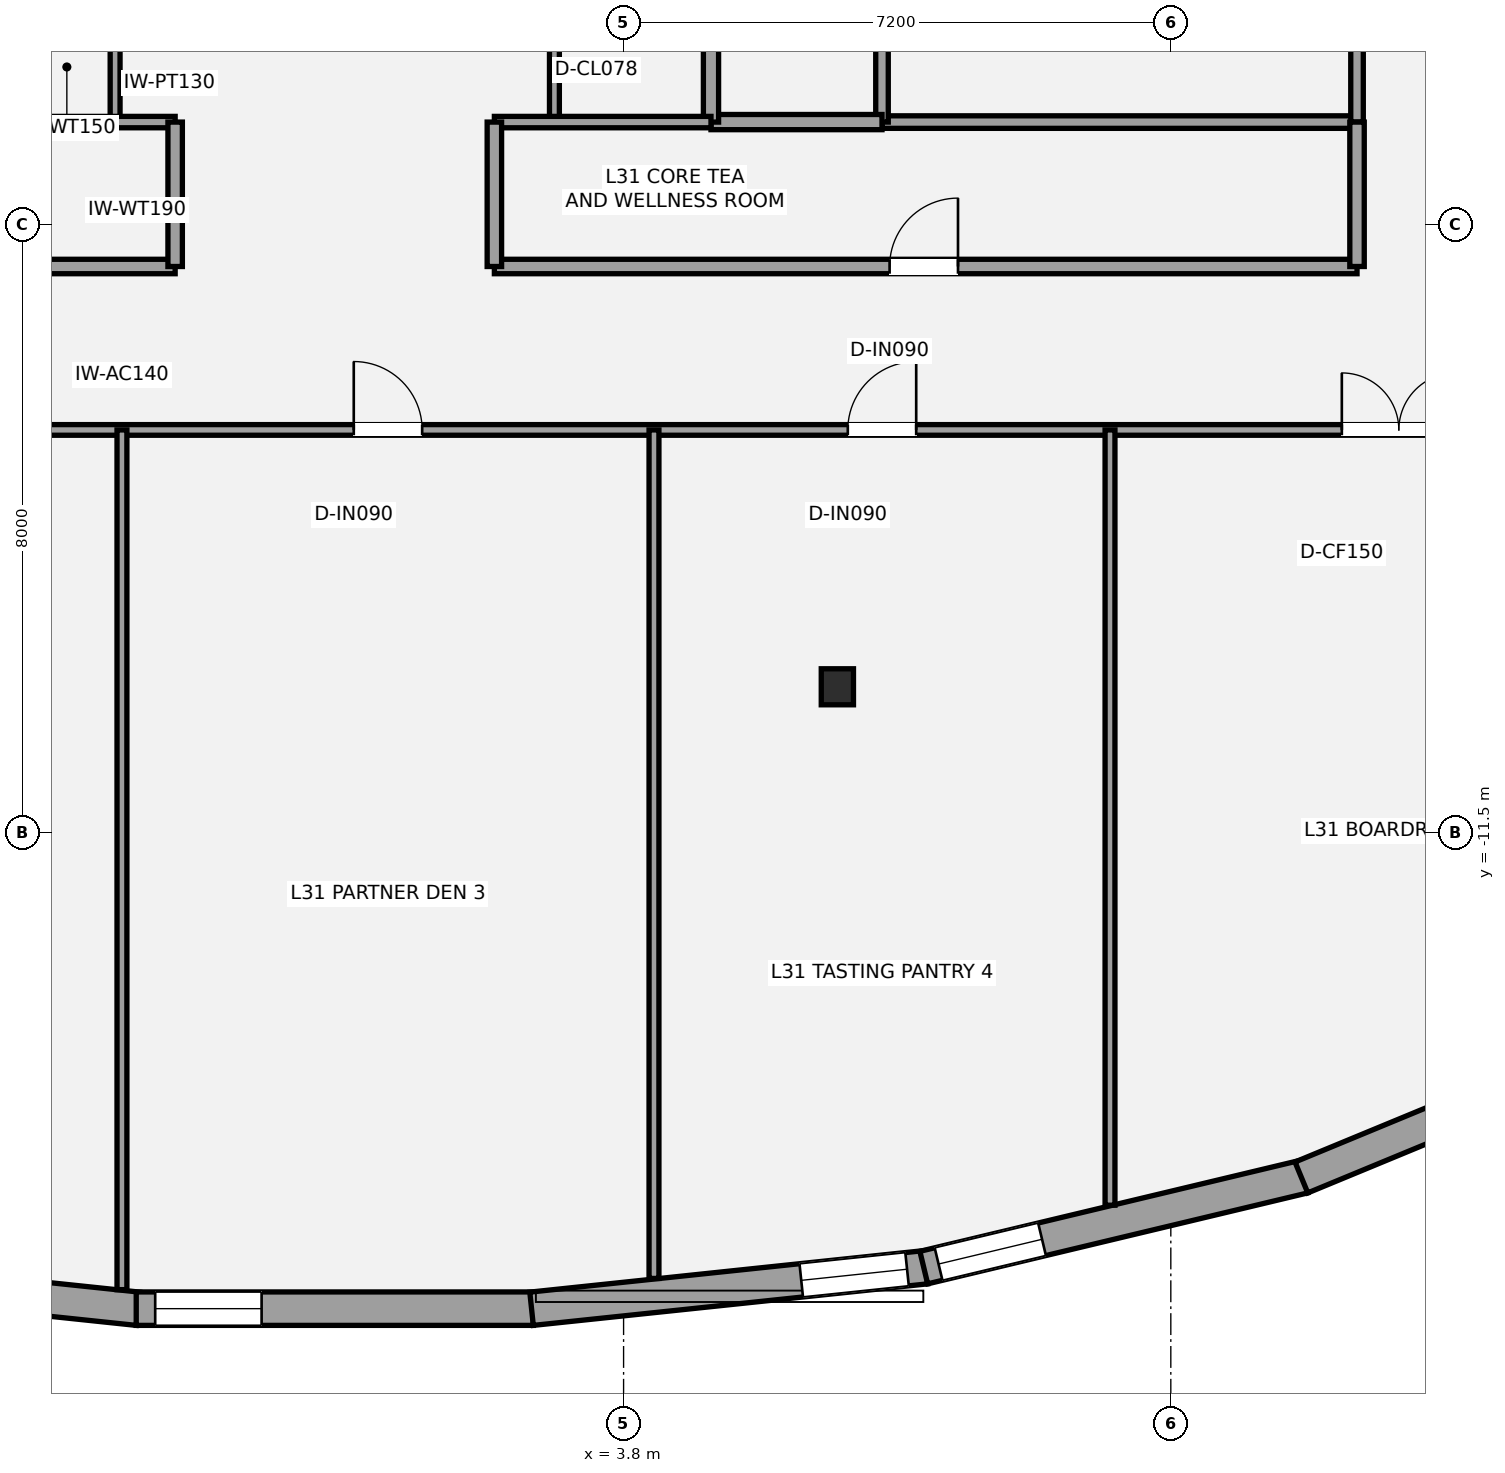
"""IFC4 building model, lengths in metres.
Left out: names, types, materials, properties, quantities, classifications, styles, units other than length and angle.
Written with IfcOpenShell. Run it as: python <this file> out.ifc"""

import sys

from ifc_helpers import new_model, si_unit, direction, frame, frame_2d, origin, origin_2d, place, context, subcontext, project, spatial, rectangle, i_section, extrude, element, fill, save


model = new_model("IFC4")
c1 = context("Model", 3, precision=1e-05, world=origin(), true_north=direction((0.0, 1.0)))
c2 = subcontext(c1, "Body", "Model", "MODEL_VIEW")
j1 = project(units=[si_unit("LENGTHUNIT", "METRE"), si_unit("PLANEANGLEUNIT", "RADIAN")], contexts=[c1])
p1 = place(None, origin())
s1 = spatial("IfcSite", under=j1, at=p1, CompositionType="ELEMENT")
p2 = place(p1, origin())
s2 = spatial("IfcBuilding", under=s1, at=p2, CompositionType="ELEMENT")
p3 = place(p2, frame((0.0, 0.0, 117.6)))
s3 = spatial("IfcBuildingStorey", under=s2, at=p3, CompositionType="ELEMENT", Elevation=117.6)
p4 = place(p3, frame((6.613, -9.579, 0.0), z_axis=(0.0, 0.0, 1.0), x_axis=(1.0, 0.0, 0.0)))
e1 = element("IfcColumn", 1, at=p4, inside=s3, PredefinedType="COLUMN", context=c2, shape_type="SweptSolid", body=[
    extrude(i_section(OverallWidth=0.424, OverallDepth=0.474, WebThickness=0.048, FlangeThickness=0.077, at=origin_2d()), origin(), (0.0, 0.0, 1.0), 3.5),
])
p5 = place(p3, frame((-2.589, -17.762, 0.0), z_axis=(0.0, 0.0, 1.0), x_axis=(-0.994501349718, 0.104723757619, 0.0)))
e2 = element("IfcWall", 2, at=p5, inside=s3, PredefinedType="STANDARD", context=c2, shape_type="SweptSolid", body=[
    extrude(rectangle(XDim=5.218, YDim=0.44, at=frame_2d((2.609, 0.0))), origin(), (0.0, 0.0, 1.0), 2.528),
])
p6 = place(p5, frame((3.568, 0.0, 0.85)))
e3 = element("IfcOpeningElement", 3, at=p6, cuts=e2, PredefinedType="OPENING", context=c2, shape_type="SweptSolid", body=[
    extrude(rectangle(XDim=1.4, YDim=1.55, at=frame_2d((0.7, 0.775))), frame((0.0, 0.23, 0.0), z_axis=(0.0, -1.0, 0.0), x_axis=(1.0, 0.0, 0.0)), (0.0, 0.0, 1.0), 0.46),
])
p7 = place(p3, frame((2.612, -17.761, 0.0), z_axis=(0.0, 0.0, 1.0), x_axis=(-1.0, 0.0, 0.0)))
e4 = element("IfcWall", 4, at=p7, inside=s3, PredefinedType="STANDARD", context=c2, shape_type="SweptSolid", body=[
    extrude(rectangle(XDim=5.225, YDim=0.44, at=frame_2d((2.612, 0.0))), origin(), (0.0, 0.0, 1.0), 2.528),
])
p8 = place(p7, frame((3.575, 0.0, 0.58)))
e5 = element("IfcOpeningElement", 5, at=p8, cuts=e4, PredefinedType="OPENING", context=c2, shape_type="SweptSolid", body=[
    extrude(rectangle(XDim=1.4, YDim=1.55, at=frame_2d((0.7, 0.775))), frame((0.0, 0.23, 0.0), z_axis=(0.0, -1.0, 0.0), x_axis=(1.0, 0.0, 0.0)), (0.0, 0.0, 1.0), 0.46),
])
p9 = place(p3, frame((7.778, -17.216, 0.0), z_axis=(0.0, 0.0, 1.0), x_axis=(-0.994501349718, -0.104723757619, 0.0)))
e6 = element("IfcWall", 6, at=p9, inside=s3, PredefinedType="STANDARD", context=c2, shape_type="SweptSolid", body=[
    extrude(rectangle(XDim=5.218, YDim=0.44, at=frame_2d((2.609, 0.0))), origin(), (0.0, 0.0, 1.0), 2.528),
])
p10 = place(p9, frame((0.25, 0.0, 0.58)))
e7 = element("IfcOpeningElement", 7, at=p10, cuts=e6, PredefinedType="OPENING", context=c2, shape_type="SweptSolid", body=[
    extrude(rectangle(XDim=1.4, YDim=1.55, at=frame_2d((0.7, 0.775))), frame((0.0, 0.23, 0.0), z_axis=(0.0, -1.0, 0.0), x_axis=(1.0, 0.0, 0.0)), (0.0, 0.0, 1.0), 0.46),
])
p11 = place(p3, frame((12.751, -16.024, 0.0), z_axis=(0.0, 0.0, 1.0), x_axis=(-0.972539655933, -0.232737228734, 0.0)))
e8 = element("IfcWall", 8, at=p11, inside=s3, PredefinedType="STANDARD", context=c2, shape_type="SweptSolid", body=[
    extrude(rectangle(XDim=5.142, YDim=0.44, at=frame_2d((2.571, 0.0))), origin(), (0.0, 0.0, 1.0), 2.528),
])
p12 = place(p11, frame((3.542, 0.0, 0.45)))
e9 = element("IfcOpeningElement", 9, at=p12, cuts=e8, PredefinedType="OPENING", context=c2, shape_type="SweptSolid", body=[
    extrude(rectangle(XDim=1.4, YDim=1.55, at=frame_2d((0.7, 0.775))), frame((0.0, 0.23, 0.0), z_axis=(0.0, -1.0, 0.0), x_axis=(1.0, 0.0, 0.0)), (0.0, 0.0, 1.0), 0.46),
])
p13 = place(p3, frame((17.286, -14.146, 0.0), z_axis=(0.0, 0.0, 1.0), x_axis=(-0.924140141084, -0.382053660678, 0.0)))
e10 = element("IfcWall", 10, at=p13, inside=s3, PredefinedType="STANDARD", context=c2, shape_type="SweptSolid", body=[
    extrude(rectangle(XDim=4.943, YDim=0.44, at=frame_2d((2.471, 0.0))), origin(), (0.0, 0.0, 1.0), 2.528),
])
p14 = place(p13, frame((0.2, 0.0, 0.45)))
e11 = element("IfcOpeningElement", 11, at=p14, cuts=e10, PredefinedType="OPENING", context=c2, shape_type="SweptSolid", body=[
    extrude(rectangle(XDim=1.4, YDim=1.55, at=frame_2d((0.7, 0.775))), frame((0.0, 0.23, 0.0), z_axis=(0.0, -1.0, 0.0), x_axis=(1.0, 0.0, 0.0)), (0.0, 0.0, 1.0), 0.46),
])
p15 = place(p3, frame((7.2, -2.15, 0.0), z_axis=(0.0, 0.0, 1.0), x_axis=(1.0, 0.0, 0.0)))
e12 = element("IfcWall", 12, at=p15, inside=s3, PredefinedType="PARTITIONING", context=c2, shape_type="SweptSolid", body=[
    extrude(rectangle(XDim=6.25, YDim=0.165, at=frame_2d((3.125, 0.0))), origin(), (0.0, 0.0, 1.0), 3.31),
])
p16 = place(p3, frame((7.2, -2.15, 0.0), z_axis=(0.0, 0.0, 1.0), x_axis=(0.0, 1.0, 0.0)))
e13 = element("IfcWall", 13, at=p16, inside=s3, PredefinedType="PARTITIONING", context=c2, shape_type="SweptSolid", body=[
    extrude(rectangle(XDim=3.3, YDim=0.165, at=frame_2d((1.65, 0.0))), origin(), (0.0, 0.0, 1.0), 2.763),
])
p17 = place(p3, frame((13.45, -2.15, 0.0), z_axis=(0.0, 0.0, 1.0), x_axis=(0.0, 1.0, 0.0)))
e14 = element("IfcWall", 14, at=p17, inside=s3, PredefinedType="PARTITIONING", context=c2, shape_type="SweptSolid", body=[
    extrude(rectangle(XDim=3.3, YDim=0.165, at=frame_2d((1.65, 0.0))), origin(), (0.0, 0.0, 1.0), 2.763),
])
p18 = place(p17, frame((1.15, 0.0, 0.0)))
e15 = element("IfcOpeningElement", 15, at=p18, cuts=e14, PredefinedType="OPENING", context=c2, shape_type="SweptSolid", body=[
    extrude(rectangle(XDim=1.05, YDim=2.15, at=frame_2d((0.525, 1.075))), frame((0.0, 0.093, 0.0), z_axis=(0.0, -1.0, 0.0), x_axis=(1.0, 0.0, 0.0)), (0.0, 0.0, 1.0), 0.185),
])
p19 = place(p3, frame((4.95, -2.15, 0.0), z_axis=(0.0, 0.0, 1.0), x_axis=(1.0, 0.0, 0.0)))
e16 = element("IfcWall", 16, at=p19, inside=s3, PredefinedType="SOLIDWALL", context=c2, shape_type="SweptSolid", body=[
    extrude(rectangle(XDim=2.25, YDim=0.2, at=frame_2d((1.125, 0.0))), origin(), (0.0, 0.0, 1.0), 3.31),
])
p20 = place(p3, frame((4.95, -2.15, 0.0), z_axis=(0.0, 0.0, 1.0), x_axis=(0.0, 1.0, 0.0)))
e17 = element("IfcWall", 17, at=p20, inside=s3, PredefinedType="SOLIDWALL", context=c2, shape_type="SweptSolid", body=[
    extrude(rectangle(XDim=3.3, YDim=0.2, at=frame_2d((1.65, 0.0))), origin(), (0.0, 0.0, 1.0), 2.763),
])
p21 = place(p20, frame((0.95, 0.0, 0.0)))
e18 = element("IfcOpeningElement", 18, at=p21, cuts=e17, PredefinedType="OPENING", context=c2, shape_type="SweptSolid", body=[
    extrude(rectangle(XDim=0.75, YDim=2.1, at=frame_2d((0.375, 1.05))), frame((0.0, 0.11, 0.0), z_axis=(0.0, -1.0, 0.0), x_axis=(1.0, 0.0, 0.0)), (0.0, 0.0, 1.0), 0.22),
])
for number, where, z_axis, x_axis in (
    (19, (-2.89, -2.15, 0.0), (0.0, 0.0, 1.0), (0.0, 1.0, 0.0)),
    (20, (2.89, -2.15, 0.0), (0.0, 0.0, 1.0), (0.0, 1.0, 0.0)),
):
    element("IfcWall", number, at=place(p3, frame(where, z_axis=z_axis, x_axis=x_axis)), inside=s3, PredefinedType="PARTITIONING", context=c2, shape_type="SweptSolid", body=[
        extrude(rectangle(XDim=1.8, YDim=0.13, at=frame_2d((0.9, 0.0))), origin(), (0.0, 0.0, 1.0), 3.31),
    ])
p22 = place(p3, frame((-6.8, -4.05, 0.0), z_axis=(0.0, 0.0, 1.0), x_axis=(1.0, 0.0, 0.0)))
e21 = element("IfcWall", 21, at=p22, inside=s3, PredefinedType="PLUMBINGWALL", context=c2, shape_type="SweptSolid", body=[
    extrude(rectangle(XDim=4.7, YDim=0.19, at=frame_2d((2.35, 0.0))), origin(), (0.0, 0.0, 1.0), 2.763),
])
p23 = place(p22, frame((1.8, 0.0, 0.0)))
e22 = element("IfcOpeningElement", 22, at=p23, cuts=e21, PredefinedType="OPENING", context=c2, shape_type="SweptSolid", body=[
    extrude(rectangle(XDim=0.95, YDim=2.15, at=frame_2d((0.475, 1.075))), frame((0.0, 0.105, 0.0), z_axis=(0.0, -1.0, 0.0), x_axis=(1.0, 0.0, 0.0)), (0.0, 0.0, 1.0), 0.21),
])
p24 = place(p3, frame((-4.95, -2.15, 0.0), z_axis=(0.0, 0.0, 1.0), x_axis=(1.0, 0.0, 0.0)))
e23 = element("IfcWall", 23, at=p24, inside=s3, PredefinedType="PLUMBINGWALL", context=c2, shape_type="SweptSolid", body=[
    extrude(rectangle(XDim=2.85, YDim=0.15, at=frame_2d((1.425, 0.0))), origin(), (0.0, 0.0, 1.0), 2.763),
])
p25 = place(p3, frame((-2.1, -4.05, 0.0), z_axis=(0.0, 0.0, 1.0), x_axis=(0.0, 1.0, 0.0)))
e24 = element("IfcWall", 24, at=p25, inside=s3, PredefinedType="PLUMBINGWALL", context=c2, shape_type="SweptSolid", body=[
    extrude(rectangle(XDim=1.9, YDim=0.19, at=frame_2d((0.95, 0.0))), origin(), (0.0, 0.0, 1.0), 3.31),
])
p26 = place(p3, frame((2.1, -4.05, 0.0), z_axis=(0.0, 0.0, 1.0), x_axis=(1.0, 0.0, 0.0)))
e25 = element("IfcWall", 25, at=p26, inside=s3, PredefinedType="PLUMBINGWALL", context=c2, shape_type="SweptSolid", body=[
    extrude(rectangle(XDim=11.35, YDim=0.19, at=frame_2d((5.675, 0.0))), origin(), (0.0, 0.0, 1.0), 2.763),
])
p27 = place(p26, frame((5.2, 0.0, 0.0)))
e26 = element("IfcOpeningElement", 26, at=p27, cuts=e25, PredefinedType="OPENING", context=c2, shape_type="SweptSolid", body=[
    extrude(rectangle(XDim=0.9, YDim=2.1, at=frame_2d((0.45, 1.05))), frame((0.0, 0.105, 0.0), z_axis=(0.0, -1.0, 0.0), x_axis=(1.0, 0.0, 0.0)), (0.0, 0.0, 1.0), 0.21),
])
p28 = place(p3, frame((2.1, -2.15, 0.0), z_axis=(0.0, 0.0, 1.0), x_axis=(1.0, 0.0, 0.0)))
e27 = element("IfcWall", 27, at=p28, inside=s3, PredefinedType="PLUMBINGWALL", context=c2, shape_type="SweptSolid", body=[
    extrude(rectangle(XDim=2.85, YDim=0.15, at=frame_2d((1.425, 0.0))), origin(), (0.0, 0.0, 1.0), 3.31),
])
for number, where, z_axis, x_axis in (
    (28, (2.1, -4.05, 0.0), (0.0, 0.0, 1.0), (0.0, 1.0, 0.0)),
    (29, (13.45, -4.05, 0.0), (0.0, 0.0, 1.0), (0.0, 1.0, 0.0)),
):
    element("IfcWall", number, at=place(p3, frame(where, z_axis=z_axis, x_axis=x_axis)), inside=s3, PredefinedType="PLUMBINGWALL", context=c2, shape_type="SweptSolid", body=[
        extrude(rectangle(XDim=1.9, YDim=0.19, at=frame_2d((0.95, 0.0))), origin(), (0.0, 0.0, 1.0), 3.31),
    ])
p29 = place(p3, frame((-16.2, -6.2, 0.0), z_axis=(0.0, 0.0, 1.0), x_axis=(1.0, 0.0, 0.0)))
e30 = element("IfcWall", 30, at=p29, inside=s3, PredefinedType="PARTITIONING", context=c2, shape_type="SweptSolid", body=[
    extrude(rectangle(XDim=34.0, YDim=0.14, at=frame_2d((17.0, 0.0))), origin(), (0.0, 0.0, 1.0), 2.688),
])
p30 = place(p29, frame((2.75, 0.0, 0.0)))
e31 = element("IfcOpeningElement", 31, at=p30, cuts=e30, PredefinedType="OPENING", context=c2, shape_type="SweptSolid", body=[
    extrude(rectangle(XDim=0.9, YDim=2.1, at=frame_2d((0.45, 1.05))), frame((0.0, 0.08, 0.0), z_axis=(0.0, -1.0, 0.0), x_axis=(1.0, 0.0, 0.0)), (0.0, 0.0, 1.0), 0.16),
])
p31 = place(p29, frame((9.45, 0.0, 0.0)))
e32 = element("IfcOpeningElement", 32, at=p31, cuts=e30, PredefinedType="OPENING", context=c2, shape_type="SweptSolid", body=[
    extrude(rectangle(XDim=0.9, YDim=2.1, at=frame_2d((0.45, 1.05))), frame((0.0, 0.08, 0.0), z_axis=(0.0, -1.0, 0.0), x_axis=(1.0, 0.0, 0.0)), (0.0, 0.0, 1.0), 0.16),
])
p32 = place(p29, frame((16.45, 0.0, 0.0)))
e33 = element("IfcOpeningElement", 33, at=p32, cuts=e30, PredefinedType="OPENING", context=c2, shape_type="SweptSolid", body=[
    extrude(rectangle(XDim=0.9, YDim=2.1, at=frame_2d((0.45, 1.05))), frame((0.0, 0.08, 0.0), z_axis=(0.0, -1.0, 0.0), x_axis=(1.0, 0.0, 0.0)), (0.0, 0.0, 1.0), 0.16),
])
p33 = place(p29, frame((22.95, 0.0, 0.0)))
e34 = element("IfcOpeningElement", 34, at=p33, cuts=e30, PredefinedType="OPENING", context=c2, shape_type="SweptSolid", body=[
    extrude(rectangle(XDim=0.9, YDim=2.1, at=frame_2d((0.45, 1.05))), frame((0.0, 0.08, 0.0), z_axis=(0.0, -1.0, 0.0), x_axis=(1.0, 0.0, 0.0)), (0.0, 0.0, 1.0), 0.16),
])
p34 = place(p29, frame((29.45, 0.0, 0.0)))
e35 = element("IfcOpeningElement", 35, at=p34, cuts=e30, PredefinedType="OPENING", context=c2, shape_type="SweptSolid", body=[
    extrude(rectangle(XDim=1.5, YDim=2.15, at=frame_2d((0.75, 1.075))), frame((0.0, 0.08, 0.0), z_axis=(0.0, -1.0, 0.0), x_axis=(1.0, 0.0, 0.0)), (0.0, 0.0, 1.0), 0.16),
])
p35 = place(p3, frame((-2.8, -17.51, 0.0), z_axis=(0.0, 0.0, 1.0), x_axis=(0.0, 1.0, 0.0)))
e36 = element("IfcWall", 36, at=p35, inside=s3, PredefinedType="PARTITIONING", context=c2, shape_type="SweptSolid", body=[
    extrude(rectangle(XDim=11.311, YDim=0.13, at=frame_2d((5.655, 0.0))), origin(), (0.0, 0.0, 1.0), 2.763),
])
p36 = place(p3, frame((4.2, -17.363, 0.0), z_axis=(0.0, 0.0, 1.0), x_axis=(0.0, 1.0, 0.0)))
e37 = element("IfcWall", 37, at=p36, inside=s3, PredefinedType="PARTITIONING", context=c2, shape_type="SweptSolid", body=[
    extrude(rectangle(XDim=11.163, YDim=0.13, at=frame_2d((5.582, 0.0))), origin(), (0.0, 0.0, 1.0), 2.763),
])
p37 = place(p3, frame((10.2, -16.4, 0.0), z_axis=(0.0, 0.0, 1.0), x_axis=(0.0, 1.0, 0.0)))
e38 = element("IfcWall", 38, at=p37, inside=s3, PredefinedType="PARTITIONING", context=c2, shape_type="SweptSolid", body=[
    extrude(rectangle(XDim=10.2, YDim=0.13, at=frame_2d((5.1, 0.0))), origin(), (0.0, 0.0, 1.0), 3.31),
])
p38 = place(p8, origin())
e39 = element("IfcWindow", 39, at=p38, inside=s3, PartitioningType="SINGLE_PANEL", PredefinedType="WINDOW", context=c2, shape_type="SweptSolid", body=[
    extrude(rectangle(XDim=1.4, YDim=1.55, at=frame_2d((0.7, 0.775))), frame((0.0, -0.01, 0.0), z_axis=(0.0, -1.0, 0.0), x_axis=(1.0, 0.0, 0.0)), (0.0, 0.0, 1.0), 0.06),
])
fill(e5, e39)
p39 = place(p10, origin())
e40 = element("IfcWindow", 40, at=p39, inside=s3, PartitioningType="SINGLE_PANEL", PredefinedType="WINDOW", context=c2, shape_type="SweptSolid", body=[
    extrude(rectangle(XDim=1.4, YDim=1.55, at=frame_2d((0.7, 0.775))), frame((0.0, -0.01, 0.0), z_axis=(0.0, -1.0, 0.0), x_axis=(1.0, 0.0, 0.0)), (0.0, 0.0, 1.0), 0.06),
])
fill(e7, e40)
p40 = place(p12, origin())
e41 = element("IfcWindow", 41, at=p40, inside=s3, PartitioningType="SINGLE_PANEL", PredefinedType="WINDOW", context=c2, shape_type="SweptSolid", body=[
    extrude(rectangle(XDim=1.4, YDim=1.55, at=frame_2d((0.7, 0.775))), frame((0.0, -0.01, 0.0), z_axis=(0.0, -1.0, 0.0), x_axis=(1.0, 0.0, 0.0)), (0.0, 0.0, 1.0), 0.06),
])
fill(e9, e41)
p41 = place(p27, origin())
e42 = element("IfcDoor", 42, at=p41, inside=s3, OperationType="SINGLE_SWING_RIGHT", PredefinedType="DOOR", context=c2, shape_type="SweptSolid", body=[
    extrude(rectangle(XDim=0.9, YDim=2.1, at=frame_2d((0.45, 1.05))), frame((0.0, 0.025, 0.0), z_axis=(0.0, -1.0, 0.0), x_axis=(1.0, 0.0, 0.0)), (0.0, 0.0, 1.0), 0.05),
])
fill(e26, e42)
p42 = place(p32, origin())
e43 = element("IfcDoor", 43, at=p42, inside=s3, OperationType="SINGLE_SWING_LEFT", PredefinedType="DOOR", context=c2, shape_type="SweptSolid", body=[
    extrude(rectangle(XDim=0.9, YDim=2.1, at=frame_2d((0.45, 1.05))), frame((0.0, 0.025, 0.0), z_axis=(0.0, -1.0, 0.0), x_axis=(1.0, 0.0, 0.0)), (0.0, 0.0, 1.0), 0.05),
])
fill(e33, e43)
p43 = place(p33, origin())
e44 = element("IfcDoor", 44, at=p43, inside=s3, OperationType="SINGLE_SWING_RIGHT", PredefinedType="DOOR", context=c2, shape_type="SweptSolid", body=[
    extrude(rectangle(XDim=0.9, YDim=2.1, at=frame_2d((0.45, 1.05))), frame((0.0, 0.025, 0.0), z_axis=(0.0, -1.0, 0.0), x_axis=(1.0, 0.0, 0.0)), (0.0, 0.0, 1.0), 0.05),
])
fill(e34, e44)
p44 = place(p34, origin())
e45 = element("IfcDoor", 45, at=p44, inside=s3, OperationType="DOUBLE_DOOR_SINGLE_SWING", PredefinedType="DOOR", context=c2, shape_type="SweptSolid", body=[
    extrude(rectangle(XDim=1.5, YDim=2.15, at=frame_2d((0.75, 1.075))), frame((0.0, 0.025, 0.0), z_axis=(0.0, -1.0, 0.0), x_axis=(1.0, 0.0, 0.0)), (0.0, 0.0, 1.0), 0.05),
])
fill(e35, e45)
save(model, sys.argv[1])
